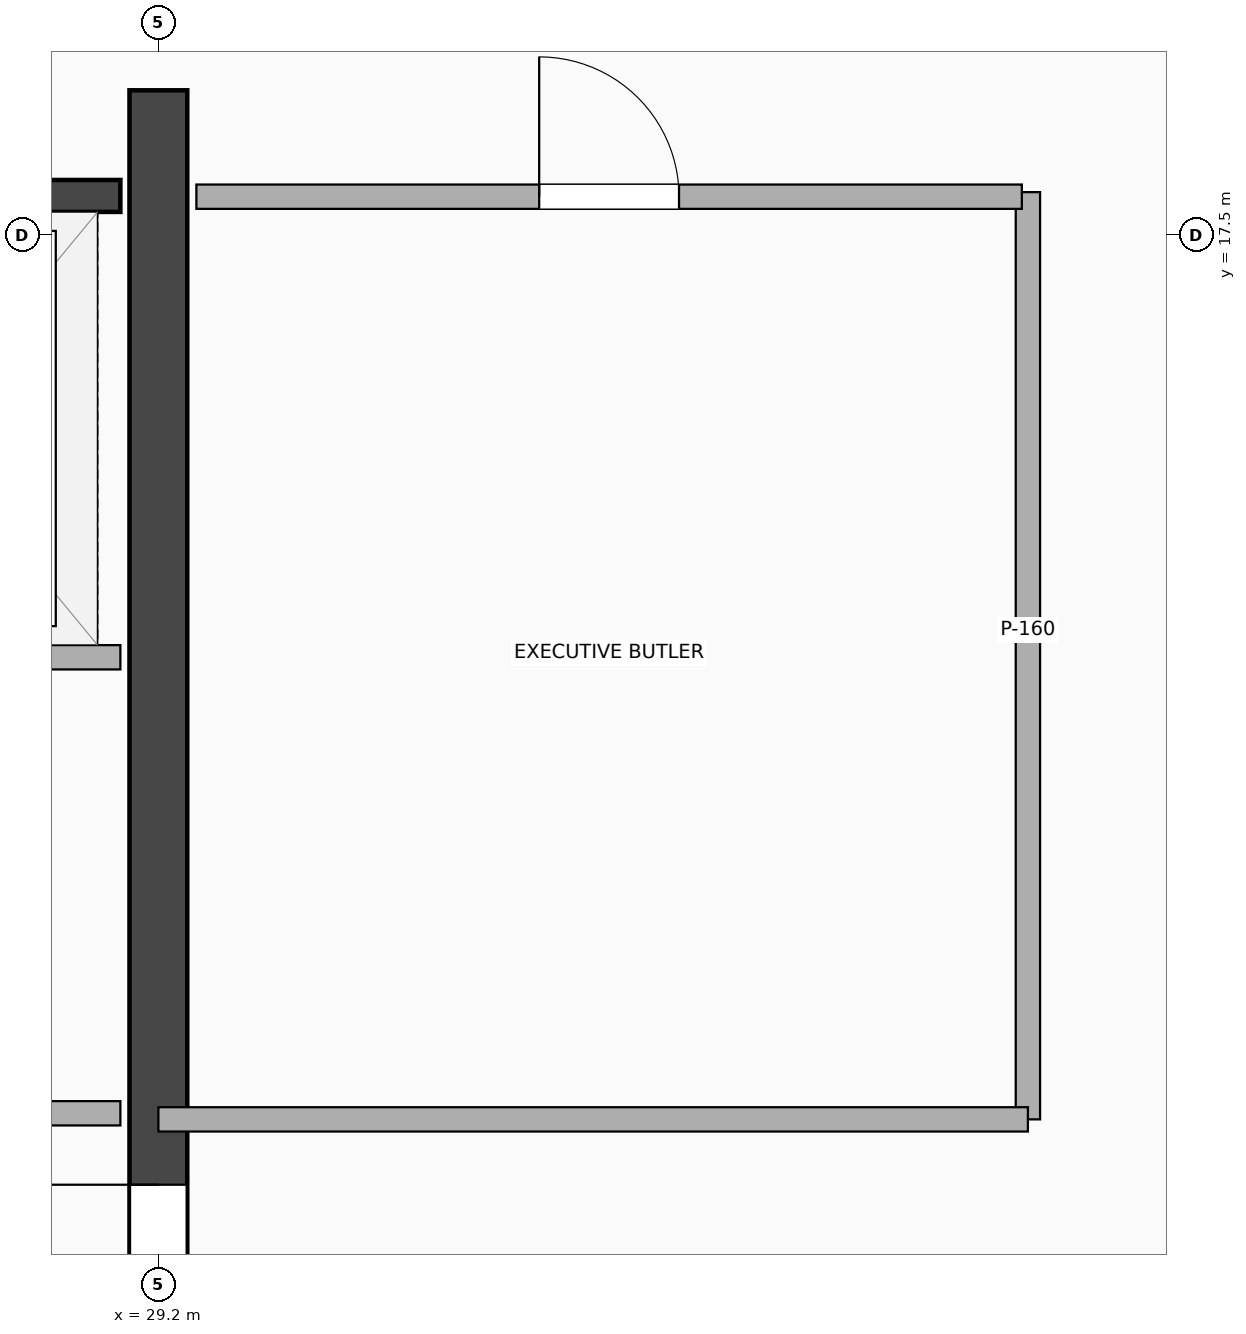
"""IFC4 building model, lengths in metres.
Left out: names, types, materials, properties, quantities, classifications, styles, units other than length and angle.
Written with IfcOpenShell. Run it as: python <this file> out.ifc"""

import sys

from ifc_helpers import new_model, si_unit, direction, frame, frame_2d, origin, place, context, subcontext, project, spatial, rectangle, extrude, element, fill, save


model = new_model("IFC4")
c1 = context("Model", 3, precision=1e-05, world=origin(), true_north=direction((0.0, 1.0)))
c2 = subcontext(c1, "Body", "Model", "MODEL_VIEW")
j1 = project(units=[si_unit("LENGTHUNIT", "METRE"), si_unit("PLANEANGLEUNIT", "RADIAN")], contexts=[c1])
p1 = place(None, origin())
s1 = spatial("IfcSite", under=j1, at=p1, CompositionType="ELEMENT")
p2 = place(p1, origin())
s2 = spatial("IfcBuilding", under=s1, at=p2, CompositionType="ELEMENT")
p3 = place(p2, frame((0.0, 0.0, 289.9)))
s3 = spatial("IfcBuildingStorey", under=s2, at=p3, CompositionType="ELEMENT", Elevation=289.9)
p4 = place(p3, frame((29.2, 3.5, 0.0), z_axis=(0.0, 0.0, 1.0), x_axis=(0.0, 1.0, 0.0)))
e1 = element("IfcWall", 1, at=p4, inside=s3, PredefinedType="SHEAR", context=c2, shape_type="SweptSolid", body=[
    extrude(rectangle(XDim=14.95, YDim=0.38, at=frame_2d((7.475, 0.0))), origin(), (0.0, 0.0, 1.0), 3.76),
])
p5 = place(p4, frame((7.75, 0.0, 0.0), z_axis=(0.0, 0.0, 1.0), x_axis=(-1.0, 0.0, 0.0)))
e2 = element("IfcOpeningElement", 2, at=p5, cuts=e1, PredefinedType="OPENING", context=c2, shape_type="SweptSolid", body=[
    extrude(rectangle(XDim=1.1, YDim=2.15, at=frame_2d((0.55, 1.075))), frame((0.0, 0.2, 0.0), z_axis=(0.0, -1.0, 0.0), x_axis=(1.0, 0.0, 0.0)), (0.0, 0.0, 1.0), 0.4),
])
p6 = place(p3, frame((20.65, 17.755, 0.0), z_axis=(0.0, 0.0, 1.0), x_axis=(1.0, 0.0, 0.0)))
e3 = element("IfcWall", 3, at=p6, inside=s3, PredefinedType="SHEAR", context=c2, shape_type="SweptSolid", body=[
    extrude(rectangle(XDim=8.3, YDim=0.21, at=frame_2d((4.15, 0.0))), origin(), (0.0, 0.0, 1.0), 3.76),
])
p7 = place(p6, frame((2.2, 0.0, 0.0), z_axis=(0.0, 0.0, 1.0), x_axis=(-1.0, 0.0, 0.0)))
e4 = element("IfcOpeningElement", 4, at=p7, cuts=e3, PredefinedType="OPENING", context=c2, shape_type="SweptSolid", body=[
    extrude(rectangle(XDim=1.05, YDim=2.15, at=frame_2d((0.525, 1.075))), frame((0.0, 0.115, 0.0), z_axis=(0.0, -1.0, 0.0), x_axis=(1.0, 0.0, 0.0)), (0.0, 0.0, 1.0), 0.23),
])
p8 = place(p6, frame((4.15, 0.0, 0.0)))
e5 = element("IfcOpeningElement", 5, at=p8, cuts=e3, PredefinedType="OPENING", context=c2, shape_type="SweptSolid", body=[
    extrude(rectangle(XDim=1.1, YDim=2.18, at=frame_2d((0.55, 1.09))), frame((0.0, 0.115, 0.0), z_axis=(0.0, -1.0, 0.0), x_axis=(1.0, 0.0, 0.0)), (0.0, 0.0, 1.0), 0.23),
])
p9 = place(p6, frame((6.45, 0.0, 0.0)))
e6 = element("IfcOpeningElement", 6, at=p9, cuts=e3, PredefinedType="OPENING", context=c2, shape_type="SweptSolid", body=[
    extrude(rectangle(XDim=1.12, YDim=2.2, at=frame_2d((0.56, 1.1))), frame((0.0, 0.115, 0.0), z_axis=(0.0, -1.0, 0.0), x_axis=(1.0, 0.0, 0.0)), (0.0, 0.0, 1.0), 0.23),
])
p10 = place(p3, frame((24.22, 14.72, 0.0), z_axis=(0.0, 0.0, 1.0), x_axis=(1.0, 0.0, 0.0)))
e7 = element("IfcWall", 7, at=p10, inside=s3, PredefinedType="PARTITIONING", context=c2, shape_type="SweptSolid", body=[
    extrude(rectangle(XDim=4.73, YDim=0.16, at=frame_2d((2.365, 0.0))), origin(), (0.0, 0.0, 1.0), 3.76),
])
p11 = place(p3, frame((24.22, 11.72, 0.0), z_axis=(0.0, 0.0, 1.0), x_axis=(1.0, 0.0, 0.0)))
e8 = element("IfcWall", 8, at=p11, inside=s3, PredefinedType="PARTITIONING", context=c2, shape_type="SweptSolid", body=[
    extrude(rectangle(XDim=4.73, YDim=0.16, at=frame_2d((2.365, 0.0))), origin(), (0.0, 0.0, 1.0), 3.76),
])
p12 = place(p11, frame((1.905, 0.0, 0.0)))
e9 = element("IfcOpeningElement", 9, at=p12, cuts=e8, PredefinedType="OPENING", context=c2, shape_type="SweptSolid", body=[
    extrude(rectangle(XDim=0.92, YDim=2.08, at=frame_2d((0.46, 1.04))), frame((0.0, 0.09, 0.0), z_axis=(0.0, -1.0, 0.0), x_axis=(1.0, 0.0, 0.0)), (0.0, 0.0, 1.0), 0.18),
])
p13 = place(p3, frame((34.92, 11.68, 0.0), z_axis=(0.0, 0.0, 1.0), x_axis=(0.0, 1.0, 0.0)))
e10 = element("IfcWall", 10, at=p13, inside=s3, PredefinedType="PARTITIONING", context=c2, shape_type="SweptSolid", body=[
    extrude(rectangle(XDim=6.1, YDim=0.16, at=frame_2d((3.05, 0.0))), origin(), (0.0, 0.0, 1.0), 3.76),
])
p14 = place(p3, frame((29.2, 11.68, 0.0), z_axis=(0.0, 0.0, 1.0), x_axis=(1.0, 0.0, 0.0)))
e11 = element("IfcWall", 11, at=p14, inside=s3, PredefinedType="PARTITIONING", context=c2, shape_type="SweptSolid", body=[
    extrude(rectangle(XDim=5.72, YDim=0.16, at=frame_2d((2.86, 0.0))), origin(), (0.0, 0.0, 1.0), 3.76),
])
p15 = place(p3, frame((29.45, 17.75, 0.0), z_axis=(0.0, 0.0, 1.0), x_axis=(1.0, 0.0, 0.0)))
e12 = element("IfcWall", 12, at=p15, inside=s3, PredefinedType="PARTITIONING", context=c2, shape_type="SweptSolid", body=[
    extrude(rectangle(XDim=5.43, YDim=0.16, at=frame_2d((2.715, 0.0))), origin(), (0.0, 0.0, 1.0), 3.76),
])
p16 = place(p15, frame((3.175, 0.0, 0.0), z_axis=(0.0, 0.0, 1.0), x_axis=(-1.0, 0.0, 0.0)))
e13 = element("IfcOpeningElement", 13, at=p16, cuts=e12, PredefinedType="OPENING", context=c2, shape_type="SweptSolid", body=[
    extrude(rectangle(XDim=0.92, YDim=2.08, at=frame_2d((0.46, 1.04))), frame((0.0, 0.09, 0.0), z_axis=(0.0, -1.0, 0.0), x_axis=(1.0, 0.0, 0.0)), (0.0, 0.0, 1.0), 0.18),
])
p17 = place(p5, origin())
e14 = element("IfcDoor", 14, at=p17, inside=s3, OperationType="SINGLE_SWING_RIGHT", PredefinedType="DOOR", context=c2, shape_type="SweptSolid", body=[
    extrude(rectangle(XDim=1.1, YDim=2.15, at=frame_2d((0.55, 1.075))), frame((0.0, 0.025, 0.0), z_axis=(0.0, -1.0, 0.0), x_axis=(1.0, 0.0, 0.0)), (0.0, 0.0, 1.0), 0.05),
])
fill(e2, e14)
p18 = place(p16, origin())
e15 = element("IfcDoor", 15, at=p18, inside=s3, OperationType="SINGLE_SWING_LEFT", PredefinedType="DOOR", context=c2, shape_type="SweptSolid", body=[
    extrude(rectangle(XDim=0.92, YDim=2.08, at=frame_2d((0.46, 1.04))), frame((0.0, 0.025, 0.0), z_axis=(0.0, -1.0, 0.0), x_axis=(1.0, 0.0, 0.0)), (0.0, 0.0, 1.0), 0.05),
])
fill(e13, e15)
save(model, sys.argv[1])
